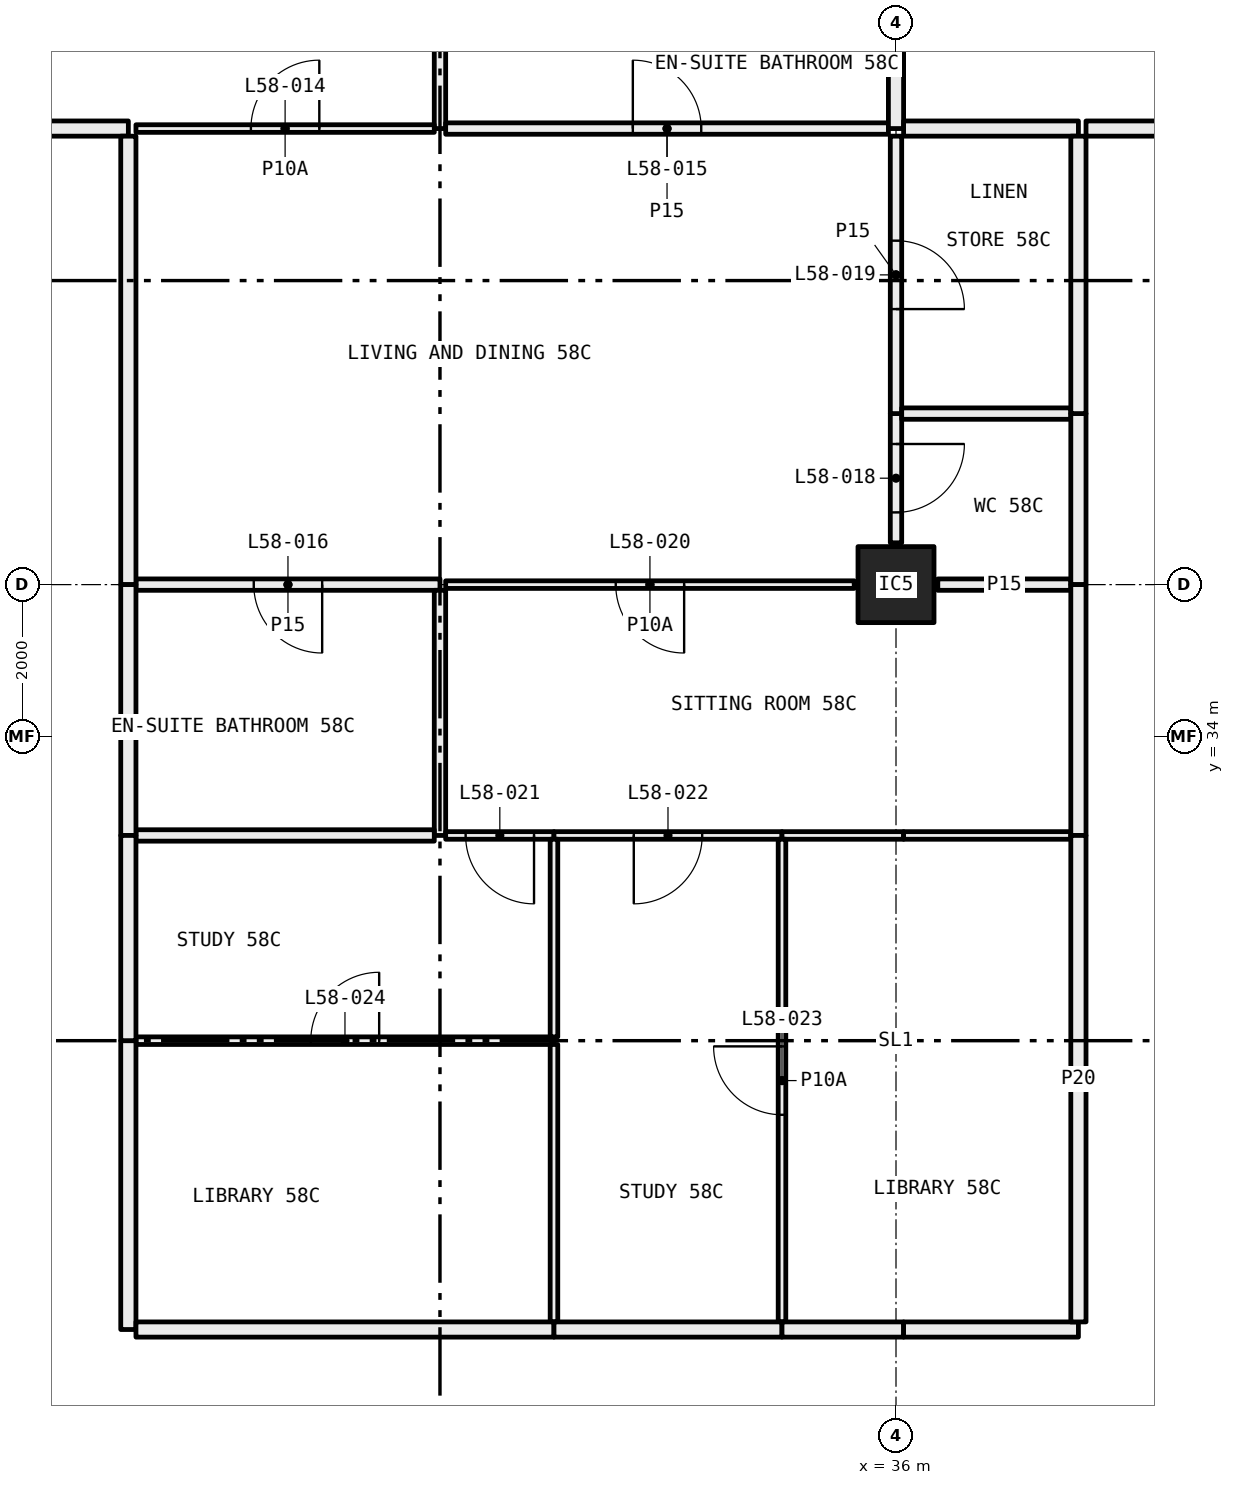
"""IFC4 building model, lengths in metres.
Left out: names, types, materials, properties, quantities, classifications, styles, units other than length and angle.
Written with IfcOpenShell. Run it as: python <this file> out.ifc"""

import sys

from ifc_helpers import new_model, si_unit, direction, frame, frame_2d, origin, origin_2d, place, context, subcontext, project, spatial, rectangle, hollow_rectangle, extrude, element, fill, save


model = new_model("IFC4")
c1 = context("Model", 3, precision=1e-05, world=origin(), true_north=direction((0.0, 1.0)))
c2 = subcontext(c1, "Body", "Model", "MODEL_VIEW")
j1 = project(units=[si_unit("LENGTHUNIT", "METRE"), si_unit("PLANEANGLEUNIT", "RADIAN")], contexts=[c1])
p1 = place(None, origin())
s1 = spatial("IfcSite", under=j1, at=p1, CompositionType="ELEMENT")
p2 = place(p1, origin())
s2 = spatial("IfcBuilding", under=s1, at=p2, CompositionType="ELEMENT")
p3 = place(p2, frame((0.0, 0.0, 217.95)))
s3 = spatial("IfcBuildingStorey", under=s2, at=p3, CompositionType="ELEMENT", Elevation=217.95)
p4 = place(p3, frame((36.0, 36.0, 0.0), z_axis=(0.0, 0.0, 1.0), x_axis=(1.0, 0.0, 0.0)))
e1 = element("IfcColumn", 1, at=p4, inside=s3, PredefinedType="COLUMN", context=c2, shape_type="SweptSolid", body=[
    extrude(hollow_rectangle(XDim=1.0, YDim=1.0, WallThickness=0.04, at=origin_2d()), origin(), (0.0, 0.0, 1.0), 3.05),
])
p5 = place(p3, frame((30.0, 42.0, 0.0), z_axis=(0.0, 0.0, 1.0), x_axis=(0.0, 1.0, 0.0)))
e2 = element("IfcWall", 2, at=p5, inside=s3, PredefinedType="PARTITIONING", context=c2, shape_type="SweptSolid", body=[
    extrude(rectangle(XDim=1.68, YDim=0.15, at=frame_2d((0.84, 0.0))), origin(), (0.0, 0.0, 1.0), 3.05),
])
p6 = place(p3, frame((26.0, 42.0, 0.0), z_axis=(0.0, 0.0, 1.0), x_axis=(1.0, 0.0, 0.0)))
e3 = element("IfcWall", 3, at=p6, inside=s3, PredefinedType="PARTITIONING", context=c2, shape_type="SweptSolid", body=[
    extrude(rectangle(XDim=3.925, YDim=0.1, at=frame_2d((1.962, 0.0))), origin(), (0.0, 0.0, 1.0), 3.05),
])
p7 = place(p6, frame((1.512, 0.0, 0.0)))
e4 = element("IfcOpeningElement", 4, at=p7, cuts=e3, PredefinedType="OPENING", context=c2, shape_type="SweptSolid", body=[
    extrude(rectangle(XDim=0.9, YDim=2.1, at=frame_2d((0.45, 1.05))), frame((0.0, 0.06, 0.0), z_axis=(0.0, -1.0, 0.0), x_axis=(1.0, 0.0, 0.0)), (0.0, 0.0, 1.0), 0.12),
])
p8 = place(p3, frame((24.0, 42.0, 0.0), z_axis=(0.0, 0.0, 1.0), x_axis=(1.0, 0.0, 0.0)))
e5 = element("IfcWall", 5, at=p8, inside=s3, PredefinedType="PARTITIONING", context=c2, shape_type="SweptSolid", body=[
    extrude(rectangle(XDim=1.9, YDim=0.2, at=frame_2d((0.95, 0.0))), origin(), (0.0, 0.0, 1.0), 3.05),
])
p9 = place(p3, frame((30.075, 42.0, 0.0), z_axis=(0.0, 0.0, 1.0), x_axis=(1.0, 0.0, 0.0)))
e6 = element("IfcWall", 6, at=p9, inside=s3, PredefinedType="PARTITIONING", context=c2, shape_type="SweptSolid", body=[
    extrude(rectangle(XDim=5.825, YDim=0.15, at=frame_2d((2.913, 0.0))), origin(), (0.0, 0.0, 1.0), 3.05),
])
p10 = place(p9, frame((2.462, 0.0, 0.0)))
e7 = element("IfcOpeningElement", 7, at=p10, cuts=e6, PredefinedType="OPENING", context=c2, shape_type="SweptSolid", body=[
    extrude(rectangle(XDim=0.9, YDim=2.1, at=frame_2d((0.45, 1.05))), frame((0.0, 0.085, 0.0), z_axis=(0.0, -1.0, 0.0), x_axis=(1.0, 0.0, 0.0)), (0.0, 0.0, 1.0), 0.17),
])
p11 = place(p3, frame((36.0, 42.0, 0.0), z_axis=(0.0, 0.0, 1.0), x_axis=(0.0, 1.0, 0.0)))
e8 = element("IfcWall", 8, at=p11, inside=s3, PredefinedType="PARTITIONING", context=c2, shape_type="SweptSolid", body=[
    extrude(rectangle(XDim=1.68, YDim=0.2, at=frame_2d((0.84, 0.0))), origin(), (0.0, 0.0, 1.0), 2.45),
])
p12 = place(p3, frame((36.0, 36.55, 0.0), z_axis=(0.0, 0.0, 1.0), x_axis=(0.0, 1.0, 0.0)))
e9 = element("IfcWall", 9, at=p12, inside=s3, PredefinedType="PARTITIONING", context=c2, shape_type="SweptSolid", body=[
    extrude(rectangle(XDim=1.7, YDim=0.15, at=frame_2d((0.85, 0.0))), origin(), (0.0, 0.0, 1.0), 2.45),
])
p13 = place(p12, frame((0.4, 0.0, 0.0)))
e10 = element("IfcOpeningElement", 10, at=p13, cuts=e9, PredefinedType="OPENING", context=c2, shape_type="SweptSolid", body=[
    extrude(rectangle(XDim=0.9, YDim=2.1, at=frame_2d((0.45, 1.05))), frame((0.0, 0.085, 0.0), z_axis=(0.0, -1.0, 0.0), x_axis=(1.0, 0.0, 0.0)), (0.0, 0.0, 1.0), 0.17),
])
p14 = place(p3, frame((36.0, 38.25, 0.0), z_axis=(0.0, 0.0, 1.0), x_axis=(0.0, 1.0, 0.0)))
e11 = element("IfcWall", 11, at=p14, inside=s3, PredefinedType="PARTITIONING", context=c2, shape_type="SweptSolid", body=[
    extrude(rectangle(XDim=3.65, YDim=0.15, at=frame_2d((1.825, 0.0))), origin(), (0.0, 0.0, 1.0), 2.45),
])
p15 = place(p14, frame((1.375, 0.0, 0.0)))
e12 = element("IfcOpeningElement", 12, at=p15, cuts=e11, PredefinedType="OPENING", context=c2, shape_type="SweptSolid", body=[
    extrude(rectangle(XDim=0.9, YDim=2.1, at=frame_2d((0.45, 1.05))), frame((0.0, 0.085, 0.0), z_axis=(0.0, -1.0, 0.0), x_axis=(1.0, 0.0, 0.0)), (0.0, 0.0, 1.0), 0.17),
])
p16 = place(p3, frame((26.0, 36.0, 0.0), z_axis=(0.0, 0.0, 1.0), x_axis=(1.0, 0.0, 0.0)))
e13 = element("IfcWall", 13, at=p16, inside=s3, PredefinedType="PARTITIONING", context=c2, shape_type="SweptSolid", body=[
    extrude(rectangle(XDim=4.0, YDim=0.15, at=frame_2d((2.0, 0.0))), origin(), (0.0, 0.0, 1.0), 2.45),
])
p17 = place(p16, frame((1.55, 0.0, 0.0)))
e14 = element("IfcOpeningElement", 14, at=p17, cuts=e13, PredefinedType="OPENING", context=c2, shape_type="SweptSolid", body=[
    extrude(rectangle(XDim=0.9, YDim=2.1, at=frame_2d((0.45, 1.05))), frame((0.0, 0.085, 0.0), z_axis=(0.0, -1.0, 0.0), x_axis=(1.0, 0.0, 0.0)), (0.0, 0.0, 1.0), 0.17),
])
p18 = place(p3, frame((30.075, 36.0, 0.0), z_axis=(0.0, 0.0, 1.0), x_axis=(1.0, 0.0, 0.0)))
e15 = element("IfcWall", 15, at=p18, inside=s3, PredefinedType="PARTITIONING", context=c2, shape_type="SweptSolid", body=[
    extrude(rectangle(XDim=5.375, YDim=0.1, at=frame_2d((2.688, 0.0))), origin(), (0.0, 0.0, 1.0), 2.45),
])
p19 = place(p18, frame((2.238, 0.0, 0.0)))
e16 = element("IfcOpeningElement", 16, at=p19, cuts=e15, PredefinedType="OPENING", context=c2, shape_type="SweptSolid", body=[
    extrude(rectangle(XDim=0.9, YDim=2.1, at=frame_2d((0.45, 1.05))), frame((0.0, 0.06, 0.0), z_axis=(0.0, -1.0, 0.0), x_axis=(1.0, 0.0, 0.0)), (0.0, 0.0, 1.0), 0.12),
])
p20 = place(p3, frame((25.9, 41.9, 0.0), z_axis=(0.0, 0.0, 1.0), x_axis=(0.0, -1.0, 0.0)))
e17 = element("IfcWall", 17, at=p20, inside=s3, PredefinedType="PARTITIONING", context=c2, shape_type="SweptSolid", body=[
    extrude(rectangle(XDim=5.9, YDim=0.2, at=frame_2d((2.95, 0.0))), origin(), (0.0, 0.0, 1.0), 2.45),
])
p21 = place(p3, frame((38.3, 38.25, 0.0), z_axis=(0.0, 0.0, 1.0), x_axis=(-1.0, 0.0, 0.0)))
e18 = element("IfcWall", 18, at=p21, inside=s3, PredefinedType="PARTITIONING", context=c2, shape_type="SweptSolid", body=[
    extrude(rectangle(XDim=2.225, YDim=0.15, at=frame_2d((1.113, 0.0))), origin(), (0.0, 0.0, 1.0), 2.45),
])
p22 = place(p3, frame((36.55, 36.0, 0.0), z_axis=(0.0, 0.0, 1.0), x_axis=(1.0, 0.0, 0.0)))
e19 = element("IfcWall", 19, at=p22, inside=s3, PredefinedType="PARTITIONING", context=c2, shape_type="SweptSolid", body=[
    extrude(rectangle(XDim=1.75, YDim=0.15, at=frame_2d((0.875, 0.0))), origin(), (0.0, 0.0, 1.0), 2.45),
])
p23 = place(p3, frame((38.4, 36.0, 0.0), z_axis=(0.0, 0.0, 1.0), x_axis=(0.0, 1.0, 0.0)))
e20 = element("IfcWall", 20, at=p23, inside=s3, PredefinedType="PARTITIONING", context=c2, shape_type="SweptSolid", body=[
    extrude(rectangle(XDim=2.25, YDim=0.2, at=frame_2d((1.125, 0.0))), origin(), (0.0, 0.0, 1.0), 2.45),
])
p24 = place(p3, frame((38.4, 42.0, 0.0), z_axis=(0.0, 0.0, 1.0), x_axis=(-1.0, 0.0, 0.0)))
e21 = element("IfcWall", 21, at=p24, inside=s3, PredefinedType="PARTITIONING", context=c2, shape_type="SweptSolid", body=[
    extrude(rectangle(XDim=2.3, YDim=0.2, at=frame_2d((1.15, 0.0))), origin(), (0.0, 0.0, 1.0), 3.05),
])
p25 = place(p3, frame((38.4, 38.25, 0.0), z_axis=(0.0, 0.0, 1.0), x_axis=(0.0, 1.0, 0.0)))
e22 = element("IfcWall", 22, at=p25, inside=s3, PredefinedType="PARTITIONING", context=c2, shape_type="SweptSolid", body=[
    extrude(rectangle(XDim=3.65, YDim=0.2, at=frame_2d((1.825, 0.0))), origin(), (0.0, 0.0, 1.0), 3.05),
])
p26 = place(p3, frame((30.0, 32.7, 0.0), z_axis=(0.0, 0.0, 1.0), x_axis=(0.0, 1.0, 0.0)))
e23 = element("IfcWall", 23, at=p26, inside=s3, PredefinedType="PARTITIONING", context=c2, shape_type="SweptSolid", body=[
    extrude(rectangle(XDim=3.225, YDim=0.15, at=frame_2d((1.613, 0.0))), origin(), (0.0, 0.0, 1.0), 2.45),
])
p27 = place(p3, frame((26.0, 32.7, 0.0), z_axis=(0.0, 0.0, 1.0), x_axis=(1.0, 0.0, 0.0)))
e24 = element("IfcWall", 24, at=p27, inside=s3, PredefinedType="PARTITIONING", context=c2, shape_type="SweptSolid", body=[
    extrude(rectangle(XDim=3.925, YDim=0.15, at=frame_2d((1.962, 0.0))), origin(), (0.0, 0.0, 1.0), 3.05),
])
p28 = place(p3, frame((25.9, 36.0, 0.0), z_axis=(0.0, 0.0, 1.0), x_axis=(0.0, -1.0, 0.0)))
e25 = element("IfcWall", 25, at=p28, inside=s3, PredefinedType="PARTITIONING", context=c2, shape_type="SweptSolid", body=[
    extrude(rectangle(XDim=3.3, YDim=0.2, at=frame_2d((1.65, 0.0))), origin(), (0.0, 0.0, 1.0), 2.45),
])
p29 = place(p3, frame((30.075, 32.7, 0.0), z_axis=(0.0, 0.0, 1.0), x_axis=(1.0, 0.0, 0.0)))
e26 = element("IfcWall", 26, at=p29, inside=s3, PredefinedType="PARTITIONING", context=c2, shape_type="SweptSolid", body=[
    extrude(rectangle(XDim=1.425, YDim=0.1, at=frame_2d((0.712, 0.0))), origin(), (0.0, 0.0, 1.0), 3.05),
])
p30 = place(p29, frame((0.262, 0.0, 0.0)))
e27 = element("IfcOpeningElement", 27, at=p30, cuts=e26, PredefinedType="OPENING", context=c2, shape_type="SweptSolid", body=[
    extrude(rectangle(XDim=0.9, YDim=2.1, at=frame_2d((0.45, 1.05))), frame((0.0, 0.06, 0.0), z_axis=(0.0, -1.0, 0.0), x_axis=(1.0, 0.0, 0.0)), (0.0, 0.0, 1.0), 0.12),
])
p31 = place(p3, frame((31.5, 32.7, 0.0), z_axis=(0.0, 0.0, 1.0), x_axis=(1.0, 0.0, 0.0)))
e28 = element("IfcWall", 28, at=p31, inside=s3, PredefinedType="PARTITIONING", context=c2, shape_type="SweptSolid", body=[
    extrude(rectangle(XDim=3.0, YDim=0.1, at=frame_2d((1.5, 0.0))), origin(), (0.0, 0.0, 1.0), 3.05),
])
p32 = place(p31, frame((1.05, 0.0, 0.0)))
e29 = element("IfcOpeningElement", 29, at=p32, cuts=e28, PredefinedType="OPENING", context=c2, shape_type="SweptSolid", body=[
    extrude(rectangle(XDim=0.9, YDim=2.1, at=frame_2d((0.45, 1.05))), frame((0.0, 0.06, 0.0), z_axis=(0.0, -1.0, 0.0), x_axis=(1.0, 0.0, 0.0)), (0.0, 0.0, 1.0), 0.12),
])
p33 = place(p3, frame((34.5, 32.7, 0.0), z_axis=(0.0, 0.0, 1.0), x_axis=(1.0, 0.0, 0.0)))
e30 = element("IfcWall", 30, at=p33, inside=s3, PredefinedType="PARTITIONING", context=c2, shape_type="SweptSolid", body=[
    extrude(rectangle(XDim=1.6, YDim=0.1, at=frame_2d((0.8, 0.0))), origin(), (0.0, 0.0, 1.0), 2.45),
])
p34 = place(p3, frame((36.1, 32.7, 0.0), z_axis=(0.0, 0.0, 1.0), x_axis=(1.0, 0.0, 0.0)))
e31 = element("IfcWall", 31, at=p34, inside=s3, PredefinedType="PARTITIONING", context=c2, shape_type="SweptSolid", body=[
    extrude(rectangle(XDim=2.2, YDim=0.1, at=frame_2d((1.1, 0.0))), origin(), (0.0, 0.0, 1.0), 3.05),
])
p35 = place(p3, frame((38.4, 32.7, 0.0), z_axis=(0.0, 0.0, 1.0), x_axis=(0.0, 1.0, 0.0)))
e32 = element("IfcWall", 32, at=p35, inside=s3, PredefinedType="PARTITIONING", context=c2, shape_type="SweptSolid", body=[
    extrude(rectangle(XDim=3.3, YDim=0.2, at=frame_2d((1.65, 0.0))), origin(), (0.0, 0.0, 1.0), 2.45),
])
p36 = place(p3, frame((31.5, 30.0, 0.0), z_axis=(0.0, 0.0, 1.0), x_axis=(-1.0, 0.0, 0.0)))
e33 = element("IfcWall", 33, at=p36, inside=s3, PredefinedType="PARTITIONING", context=c2, shape_type="SweptSolid", body=[
    extrude(rectangle(XDim=5.5, YDim=0.1, at=frame_2d((2.75, 0.0))), origin(), (0.0, 0.0, 1.0), 3.05),
])
p37 = place(p36, frame((2.3, 0.0, 0.0)))
e34 = element("IfcOpeningElement", 34, at=p37, cuts=e33, PredefinedType="OPENING", context=c2, shape_type="SweptSolid", body=[
    extrude(rectangle(XDim=0.9, YDim=2.1, at=frame_2d((0.45, 1.05))), frame((0.0, 0.06, 0.0), z_axis=(0.0, -1.0, 0.0), x_axis=(1.0, 0.0, 0.0)), (0.0, 0.0, 1.0), 0.12),
])
p38 = place(p3, frame((31.5, 26.3, 0.0), z_axis=(0.0, 0.0, 1.0), x_axis=(0.0, 1.0, 0.0)))
e35 = element("IfcWall", 35, at=p38, inside=s3, PredefinedType="PARTITIONING", context=c2, shape_type="SweptSolid", body=[
    extrude(rectangle(XDim=3.65, YDim=0.1, at=frame_2d((1.825, 0.0))), origin(), (0.0, 0.0, 1.0), 3.05),
])
p39 = place(p3, frame((25.9, 30.0, 0.0), z_axis=(0.0, 0.0, 1.0), x_axis=(0.0, -1.0, 0.0)))
e36 = element("IfcWall", 36, at=p39, inside=s3, PredefinedType="PARTITIONING", context=c2, shape_type="SweptSolid", body=[
    extrude(rectangle(XDim=3.8, YDim=0.2, at=frame_2d((1.9, 0.0))), origin(), (0.0, 0.0, 1.0), 3.05),
])
p40 = place(p3, frame((26.0, 26.2, 0.0), z_axis=(0.0, 0.0, 1.0), x_axis=(1.0, 0.0, 0.0)))
e37 = element("IfcWall", 37, at=p40, inside=s3, PredefinedType="PARTITIONING", context=c2, shape_type="SweptSolid", body=[
    extrude(rectangle(XDim=5.5, YDim=0.2, at=frame_2d((2.75, 0.0))), origin(), (0.0, 0.0, 1.0), 3.05),
])
p41 = place(p3, frame((31.5, 30.05, 0.0), z_axis=(0.0, 0.0, 1.0), x_axis=(0.0, 1.0, 0.0)))
e38 = element("IfcWall", 38, at=p41, inside=s3, PredefinedType="PARTITIONING", context=c2, shape_type="SweptSolid", body=[
    extrude(rectangle(XDim=2.6, YDim=0.1, at=frame_2d((1.3, 0.0))), origin(), (0.0, 0.0, 1.0), 3.05),
])
p42 = place(p3, frame((25.9, 32.7, 0.0), z_axis=(0.0, 0.0, 1.0), x_axis=(0.0, -1.0, 0.0)))
e39 = element("IfcWall", 39, at=p42, inside=s3, PredefinedType="PARTITIONING", context=c2, shape_type="SweptSolid", body=[
    extrude(rectangle(XDim=2.7, YDim=0.2, at=frame_2d((1.35, 0.0))), origin(), (0.0, 0.0, 1.0), 3.05),
])
p43 = place(p3, frame((34.5, 26.3, 0.0), z_axis=(0.0, 0.0, 1.0), x_axis=(0.0, 1.0, 0.0)))
e40 = element("IfcWall", 40, at=p43, inside=s3, PredefinedType="PARTITIONING", context=c2, shape_type="SweptSolid", body=[
    extrude(rectangle(XDim=6.35, YDim=0.1, at=frame_2d((3.175, 0.0))), origin(), (0.0, 0.0, 1.0), 3.05),
])
p44 = place(p43, frame((2.725, 0.0, 0.0)))
e41 = element("IfcOpeningElement", 41, at=p44, cuts=e40, PredefinedType="OPENING", context=c2, shape_type="SweptSolid", body=[
    extrude(rectangle(XDim=0.9, YDim=2.1, at=frame_2d((0.45, 1.05))), frame((0.0, 0.06, 0.0), z_axis=(0.0, -1.0, 0.0), x_axis=(1.0, 0.0, 0.0)), (0.0, 0.0, 1.0), 0.12),
])
p45 = place(p3, frame((31.5, 26.2, 0.0), z_axis=(0.0, 0.0, 1.0), x_axis=(1.0, 0.0, 0.0)))
e42 = element("IfcWall", 42, at=p45, inside=s3, PredefinedType="PARTITIONING", context=c2, shape_type="SweptSolid", body=[
    extrude(rectangle(XDim=3.0, YDim=0.2, at=frame_2d((1.5, 0.0))), origin(), (0.0, 0.0, 1.0), 3.05),
])
p46 = place(p3, frame((34.5, 26.2, 0.0), z_axis=(0.0, 0.0, 1.0), x_axis=(1.0, 0.0, 0.0)))
e43 = element("IfcWall", 43, at=p46, inside=s3, PredefinedType="PARTITIONING", context=c2, shape_type="SweptSolid", body=[
    extrude(rectangle(XDim=1.6, YDim=0.2, at=frame_2d((0.8, 0.0))), origin(), (0.0, 0.0, 1.0), 2.45),
])
p47 = place(p3, frame((36.1, 26.2, 0.0), z_axis=(0.0, 0.0, 1.0), x_axis=(1.0, 0.0, 0.0)))
e44 = element("IfcWall", 44, at=p47, inside=s3, PredefinedType="PARTITIONING", context=c2, shape_type="SweptSolid", body=[
    extrude(rectangle(XDim=2.3, YDim=0.2, at=frame_2d((1.15, 0.0))), origin(), (0.0, 0.0, 1.0), 3.05),
])
p48 = place(p3, frame((38.4, 26.3, 0.0), z_axis=(0.0, 0.0, 1.0), x_axis=(0.0, 1.0, 0.0)))
e45 = element("IfcWall", 45, at=p48, inside=s3, PredefinedType="PARTITIONING", context=c2, shape_type="SweptSolid", body=[
    extrude(rectangle(XDim=6.4, YDim=0.2, at=frame_2d((3.2, 0.0))), origin(), (0.0, 0.0, 1.0), 3.05),
])
p49 = place(p3, frame((38.5, 42.0, 0.0), z_axis=(0.0, 0.0, 1.0), x_axis=(1.0, 0.0, 0.0)))
e46 = element("IfcWall", 46, at=p49, inside=s3, PredefinedType="PARTITIONING", context=c2, shape_type="SweptSolid", body=[
    extrude(rectangle(XDim=2.3, YDim=0.2, at=frame_2d((1.15, 0.0))), origin(), (0.0, 0.0, 1.0), 3.05),
])
p50 = place(p7, origin())
e47 = element("IfcDoor", 47, at=p50, inside=s3, OperationType="SINGLE_SWING_LEFT", PredefinedType="DOOR", context=c2, shape_type="SweptSolid", body=[
    extrude(rectangle(XDim=0.9, YDim=2.1, at=frame_2d((0.45, 1.05))), frame((0.0, 0.025, 0.0), z_axis=(0.0, -1.0, 0.0), x_axis=(1.0, 0.0, 0.0)), (0.0, 0.0, 1.0), 0.05),
])
fill(e4, e47)
p51 = place(p10, origin())
e48 = element("IfcDoor", 48, at=p51, inside=s3, OperationType="SINGLE_SWING_RIGHT", PredefinedType="DOOR", context=c2, shape_type="SweptSolid", body=[
    extrude(rectangle(XDim=0.9, YDim=2.1, at=frame_2d((0.45, 1.05))), frame((0.0, 0.025, 0.0), z_axis=(0.0, -1.0, 0.0), x_axis=(1.0, 0.0, 0.0)), (0.0, 0.0, 1.0), 0.05),
])
fill(e7, e48)
p52 = place(p17, frame((0.9, 0.0, 0.0), x_axis=(-1.0, 0.0, 0.0)))
e49 = element("IfcDoor", 49, at=p52, inside=s3, OperationType="SINGLE_SWING_RIGHT", PredefinedType="DOOR", context=c2, shape_type="SweptSolid", body=[
    extrude(rectangle(XDim=0.9, YDim=2.1, at=frame_2d((0.45, 1.05))), frame((0.0, 0.025, 0.0), z_axis=(0.0, -1.0, 0.0), x_axis=(1.0, 0.0, 0.0)), (0.0, 0.0, 1.0), 0.05),
])
fill(e14, e49)
p53 = place(p13, frame((0.9, 0.0, 0.0), x_axis=(-1.0, 0.0, 0.0)))
e50 = element("IfcDoor", 50, at=p53, inside=s3, OperationType="SINGLE_SWING_RIGHT", PredefinedType="DOOR", context=c2, shape_type="SweptSolid", body=[
    extrude(rectangle(XDim=0.9, YDim=2.1, at=frame_2d((0.45, 1.05))), frame((0.0, 0.025, 0.0), z_axis=(0.0, -1.0, 0.0), x_axis=(1.0, 0.0, 0.0)), (0.0, 0.0, 1.0), 0.05),
])
fill(e10, e50)
p54 = place(p15, frame((0.9, 0.0, 0.0), x_axis=(-1.0, 0.0, 0.0)))
e51 = element("IfcDoor", 51, at=p54, inside=s3, OperationType="SINGLE_SWING_LEFT", PredefinedType="DOOR", context=c2, shape_type="SweptSolid", body=[
    extrude(rectangle(XDim=0.9, YDim=2.1, at=frame_2d((0.45, 1.05))), frame((0.0, 0.025, 0.0), z_axis=(0.0, -1.0, 0.0), x_axis=(1.0, 0.0, 0.0)), (0.0, 0.0, 1.0), 0.05),
])
fill(e12, e51)
p55 = place(p19, frame((0.9, 0.0, 0.0), x_axis=(-1.0, 0.0, 0.0)))
e52 = element("IfcDoor", 52, at=p55, inside=s3, OperationType="SINGLE_SWING_RIGHT", PredefinedType="DOOR", context=c2, shape_type="SweptSolid", body=[
    extrude(rectangle(XDim=0.9, YDim=2.1, at=frame_2d((0.45, 1.05))), frame((0.0, 0.025, 0.0), z_axis=(0.0, -1.0, 0.0), x_axis=(1.0, 0.0, 0.0)), (0.0, 0.0, 1.0), 0.05),
])
fill(e16, e52)
p56 = place(p30, frame((0.9, 0.0, 0.0), x_axis=(-1.0, 0.0, 0.0)))
e53 = element("IfcDoor", 53, at=p56, inside=s3, OperationType="SINGLE_SWING_RIGHT", PredefinedType="DOOR", context=c2, shape_type="SweptSolid", body=[
    extrude(rectangle(XDim=0.9, YDim=2.1, at=frame_2d((0.45, 1.05))), frame((0.0, 0.025, 0.0), z_axis=(0.0, -1.0, 0.0), x_axis=(1.0, 0.0, 0.0)), (0.0, 0.0, 1.0), 0.05),
])
fill(e27, e53)
p57 = place(p32, frame((0.9, 0.0, 0.0), x_axis=(-1.0, 0.0, 0.0)))
e54 = element("IfcDoor", 54, at=p57, inside=s3, OperationType="SINGLE_SWING_LEFT", PredefinedType="DOOR", context=c2, shape_type="SweptSolid", body=[
    extrude(rectangle(XDim=0.9, YDim=2.1, at=frame_2d((0.45, 1.05))), frame((0.0, 0.025, 0.0), z_axis=(0.0, -1.0, 0.0), x_axis=(1.0, 0.0, 0.0)), (0.0, 0.0, 1.0), 0.05),
])
fill(e29, e54)
p58 = place(p44, origin())
e55 = element("IfcDoor", 55, at=p58, inside=s3, OperationType="SINGLE_SWING_LEFT", PredefinedType="DOOR", context=c2, shape_type="SweptSolid", body=[
    extrude(rectangle(XDim=0.9, YDim=2.1, at=frame_2d((0.45, 1.05))), frame((0.0, 0.025, 0.0), z_axis=(0.0, -1.0, 0.0), x_axis=(1.0, 0.0, 0.0)), (0.0, 0.0, 1.0), 0.05),
])
fill(e41, e55)
p59 = place(p37, frame((0.9, 0.0, 0.0), x_axis=(-1.0, 0.0, 0.0)))
e56 = element("IfcDoor", 56, at=p59, inside=s3, OperationType="SINGLE_SWING_LEFT", PredefinedType="DOOR", context=c2, shape_type="SweptSolid", body=[
    extrude(rectangle(XDim=0.9, YDim=2.1, at=frame_2d((0.45, 1.05))), frame((0.0, 0.025, 0.0), z_axis=(0.0, -1.0, 0.0), x_axis=(1.0, 0.0, 0.0)), (0.0, 0.0, 1.0), 0.05),
])
fill(e34, e56)
save(model, sys.argv[1])
